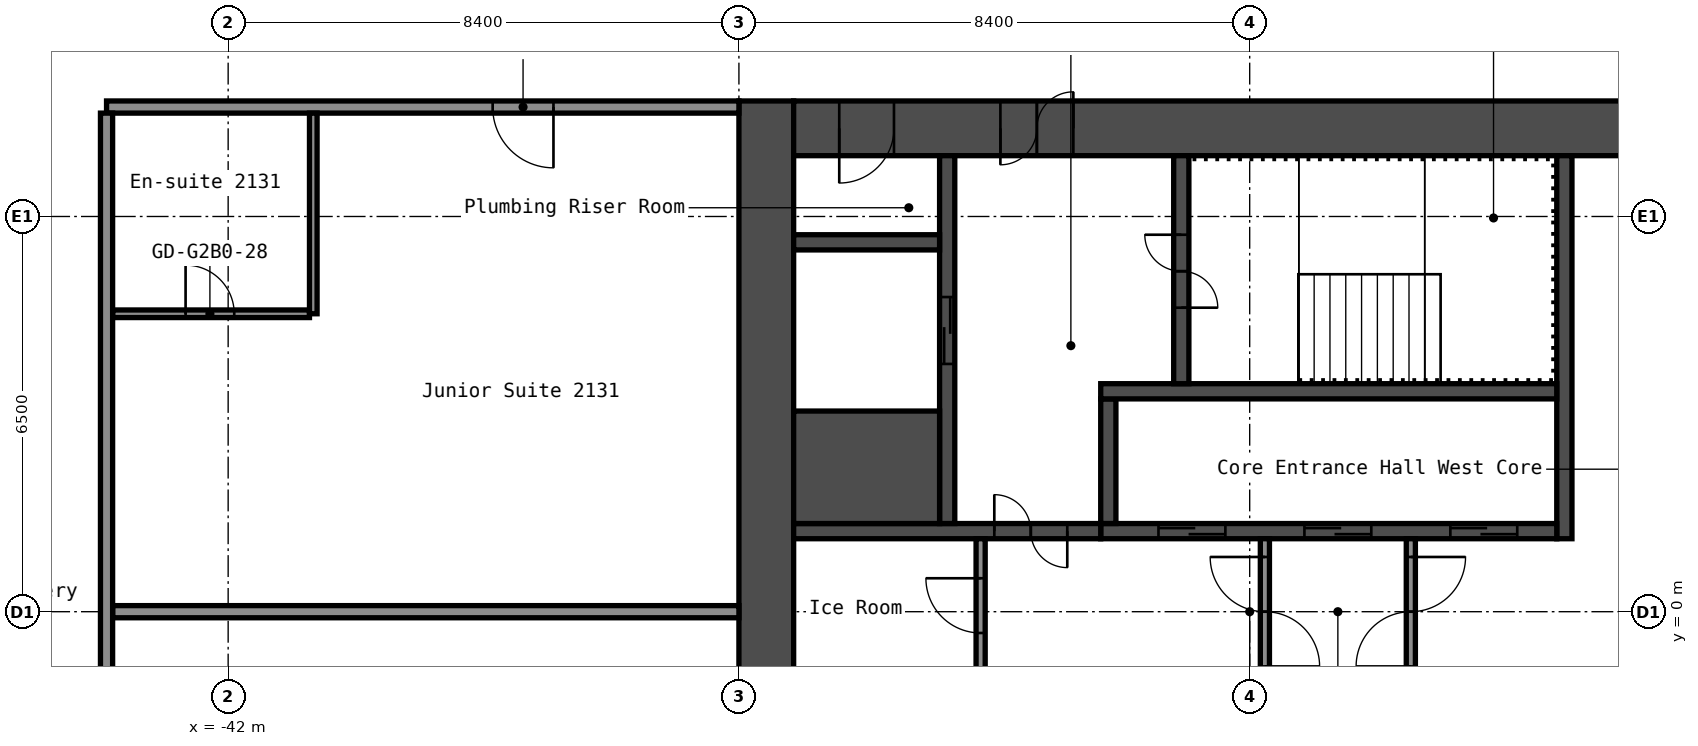
"""IFC4 building model, lengths in metres.
Left out: names, types, materials, properties, quantities, classifications, styles, units other than length and angle.
Written with IfcOpenShell. Run it as: python <this file> out.ifc"""

import sys

from ifc_helpers import new_model, si_unit, direction, frame, frame_2d, origin, place, context, subcontext, project, spatial, rectangle, extrude, element, fill, save


model = new_model("IFC4")
c1 = context("Model", 3, precision=1e-05, world=origin(), true_north=direction((0.0, 1.0)))
c2 = subcontext(c1, "Body", "Model", "MODEL_VIEW")
j1 = project(units=[si_unit("LENGTHUNIT", "METRE"), si_unit("PLANEANGLEUNIT", "RADIAN")], contexts=[c1])
p1 = place(None, origin())
s1 = spatial("IfcSite", under=j1, at=p1, CompositionType="ELEMENT")
p2 = place(p1, origin())
s2 = spatial("IfcBuilding", under=s1, at=p2, CompositionType="ELEMENT")
p3 = place(p2, frame((0.0, 0.0, 78.6)))
s3 = spatial("IfcBuildingStorey", under=s2, at=p3, CompositionType="ELEMENT", Elevation=78.6)
p4 = place(p3, frame((-33.15, -8.4, 0.0), z_axis=(0.0, 0.0, 1.0), x_axis=(0.0, 1.0, 0.0)))
e1 = element("IfcWall", 1, at=p4, inside=s3, PredefinedType="SHEAR", context=c2, shape_type="SweptSolid", body=[
    extrude(rectangle(XDim=16.8, YDim=0.9, at=frame_2d((8.4, 0.0))), origin(), (0.0, 0.0, 1.0), 2.8),
])
p5 = place(p3, frame((-32.7, 7.95, 0.0), z_axis=(0.0, 0.0, 1.0), x_axis=(1.0, 0.0, 0.0)))
e2 = element("IfcWall", 2, at=p5, inside=s3, PredefinedType="SHEAR", context=c2, shape_type="SweptSolid", body=[
    extrude(rectangle(XDim=15.0, YDim=0.9, at=frame_2d((7.5, 0.0))), origin(), (0.0, 0.0, 1.0), 2.8),
])
p6 = place(p5, frame((3.4, 0.0, 0.0)))
e3 = element("IfcOpeningElement", 3, at=p6, cuts=e2, PredefinedType="OPENING", context=c2, shape_type="SweptSolid", body=[
    extrude(rectangle(XDim=1.2, YDim=2.1, at=frame_2d((0.6, 1.05))), frame((0.0, 0.46, 0.0), z_axis=(0.0, -1.0, 0.0), x_axis=(1.0, 0.0, 0.0)), (0.0, 0.0, 1.0), 0.92),
])
p7 = place(p5, frame((0.75, 0.0, 0.0)))
e4 = element("IfcOpeningElement", 4, at=p7, cuts=e2, PredefinedType="OPENING", context=c2, shape_type="SweptSolid", body=[
    extrude(rectangle(XDim=0.9, YDim=2.1, at=frame_2d((0.45, 1.05))), frame((0.0, 0.46, 0.0), z_axis=(0.0, -1.0, 0.0), x_axis=(1.0, 0.0, 0.0)), (0.0, 0.0, 1.0), 0.92),
])
p8 = place(p3, frame((-20.025, 1.2, 0.0), z_axis=(0.0, 0.0, 1.0), x_axis=(0.0, 1.0, 0.0)))
e5 = element("IfcWall", 5, at=p8, inside=s3, PredefinedType="SHEAR", context=c2, shape_type="SweptSolid", body=[
    extrude(rectangle(XDim=6.3, YDim=0.25, at=frame_2d((3.15, 0.0))), origin(), (0.0, 0.0, 1.0), 2.8),
])
p9 = place(p3, frame((-27.65, 1.325, 0.0), z_axis=(0.0, 0.0, 1.0), x_axis=(1.0, 0.0, 0.0)))
e6 = element("IfcWall", 6, at=p9, inside=s3, PredefinedType="SHEAR", context=c2, shape_type="SweptSolid", body=[
    extrude(rectangle(XDim=7.5, YDim=0.25, at=frame_2d((3.75, 0.0))), origin(), (0.0, 0.0, 1.0), 2.8),
])
p10 = place(p9, frame((5.75, 0.0, 0.0)))
e7 = element("IfcOpeningElement", 7, at=p10, cuts=e6, PredefinedType="OPENING", context=c2, shape_type="SweptSolid", body=[
    extrude(rectangle(XDim=1.1, YDim=2.1, at=frame_2d((0.55, 1.05))), frame((0.0, 0.135, 0.0), z_axis=(0.0, -1.0, 0.0), x_axis=(1.0, 0.0, 0.0)), (0.0, 0.0, 1.0), 0.27),
])
p11 = place(p9, frame((3.35, 0.0, 0.0)))
e8 = element("IfcOpeningElement", 8, at=p11, cuts=e6, PredefinedType="OPENING", context=c2, shape_type="SweptSolid", body=[
    extrude(rectangle(XDim=1.1, YDim=2.1, at=frame_2d((0.55, 1.05))), frame((0.0, 0.135, 0.0), z_axis=(0.0, -1.0, 0.0), x_axis=(1.0, 0.0, 0.0)), (0.0, 0.0, 1.0), 0.27),
])
p12 = place(p9, frame((0.95, 0.0, 0.0)))
e9 = element("IfcOpeningElement", 9, at=p12, cuts=e6, PredefinedType="OPENING", context=c2, shape_type="SweptSolid", body=[
    extrude(rectangle(XDim=1.1, YDim=2.1, at=frame_2d((0.55, 1.05))), frame((0.0, 0.135, 0.0), z_axis=(0.0, -1.0, 0.0), x_axis=(1.0, 0.0, 0.0)), (0.0, 0.0, 1.0), 0.27),
])
p13 = place(p3, frame((-27.525, 1.45, 0.0), z_axis=(0.0, 0.0, 1.0), x_axis=(0.0, 1.0, 0.0)))
e10 = element("IfcWall", 10, at=p13, inside=s3, PredefinedType="SHEAR", context=c2, shape_type="SweptSolid", body=[
    extrude(rectangle(XDim=2.05, YDim=0.25, at=frame_2d((1.025, 0.0))), origin(), (0.0, 0.0, 1.0), 2.8),
])
p14 = place(p3, frame((-27.65, 3.625, 0.0), z_axis=(0.0, 0.0, 1.0), x_axis=(1.0, 0.0, 0.0)))
e11 = element("IfcWall", 11, at=p14, inside=s3, PredefinedType="SHEAR", context=c2, shape_type="SweptSolid", body=[
    extrude(rectangle(XDim=7.5, YDim=0.25, at=frame_2d((3.75, 0.0))), origin(), (0.0, 0.0, 1.0), 2.8),
])
p15 = place(p3, frame((-26.325, 3.75, 0.0), z_axis=(0.0, 0.0, 1.0), x_axis=(0.0, 1.0, 0.0)))
e12 = element("IfcWall", 12, at=p15, inside=s3, PredefinedType="SHEAR", context=c2, shape_type="SweptSolid", body=[
    extrude(rectangle(XDim=3.75, YDim=0.25, at=frame_2d((1.875, 0.0))), origin(), (0.0, 0.0, 1.0), 2.8),
])
p16 = place(p15, frame((1.25, 0.0, 0.0)))
e13 = element("IfcOpeningElement", 13, at=p16, cuts=e12, PredefinedType="OPENING", context=c2, shape_type="SweptSolid", body=[
    extrude(rectangle(XDim=1.2, YDim=2.1, at=frame_2d((0.6, 1.05))), frame((0.0, 0.135, 0.0), z_axis=(0.0, -1.0, 0.0), x_axis=(1.0, 0.0, 0.0)), (0.0, 0.0, 1.0), 0.27),
])
p17 = place(p3, frame((-32.7, 1.325, 0.0), z_axis=(0.0, 0.0, 1.0), x_axis=(1.0, 0.0, 0.0)))
e14 = element("IfcWall", 14, at=p17, inside=s3, PredefinedType="SHEAR", context=c2, shape_type="SweptSolid", body=[
    extrude(rectangle(XDim=5.05, YDim=0.25, at=frame_2d((2.525, 0.0))), origin(), (0.0, 0.0, 1.0), 2.8),
])
p18 = place(p17, frame((3.3, 0.0, 0.0)))
e15 = element("IfcOpeningElement", 15, at=p18, cuts=e14, PredefinedType="OPENING", context=c2, shape_type="SweptSolid", body=[
    extrude(rectangle(XDim=1.2, YDim=2.1, at=frame_2d((0.6, 1.05))), frame((0.0, 0.135, 0.0), z_axis=(0.0, -1.0, 0.0), x_axis=(1.0, 0.0, 0.0)), (0.0, 0.0, 1.0), 0.27),
])
p19 = place(p3, frame((-30.175, 1.45, 0.0), z_axis=(0.0, 0.0, 1.0), x_axis=(0.0, 1.0, 0.0)))
e16 = element("IfcWall", 16, at=p19, inside=s3, PredefinedType="SHEAR", context=c2, shape_type="SweptSolid", body=[
    extrude(rectangle(XDim=6.05, YDim=0.25, at=frame_2d((3.025, 0.0))), origin(), (0.0, 0.0, 1.0), 2.8),
])
p20 = place(p19, frame((2.625, 0.0, 0.0)))
e17 = element("IfcOpeningElement", 17, at=p20, cuts=e16, PredefinedType="OPENING", context=c2, shape_type="SweptSolid", body=[
    extrude(rectangle(XDim=1.1, YDim=2.1, at=frame_2d((0.55, 1.05))), frame((0.0, 0.135, 0.0), z_axis=(0.0, -1.0, 0.0), x_axis=(1.0, 0.0, 0.0)), (0.0, 0.0, 1.0), 0.27),
])
p21 = place(p3, frame((-32.7, 2.375, 0.0), z_axis=(0.0, 0.0, 1.0), x_axis=(1.0, 0.0, 0.0)))
e18 = element("IfcWall", 18, at=p21, inside=s3, PredefinedType="SHEAR", context=c2, shape_type="SweptSolid", body=[
    extrude(rectangle(XDim=2.4, YDim=1.85, at=frame_2d((1.2, 0.0))), origin(), (0.0, 0.0, 1.0), 2.8),
])
p22 = place(p3, frame((-32.7, 6.075, 0.0), z_axis=(0.0, 0.0, 1.0), x_axis=(1.0, 0.0, 0.0)))
e19 = element("IfcWall", 19, at=p22, inside=s3, PredefinedType="SHEAR", context=c2, shape_type="SweptSolid", body=[
    extrude(rectangle(XDim=2.4, YDim=0.25, at=frame_2d((1.2, 0.0))), origin(), (0.0, 0.0, 1.0), 2.8),
])
p23 = place(p3, frame((-22.55, -1.2, 0.0), z_axis=(0.0, 0.0, 1.0), x_axis=(0.0, 1.0, 0.0)))
e20 = element("IfcWall", 20, at=p23, inside=s3, PredefinedType="PARTITIONING", context=c2, shape_type="SweptSolid", body=[
    extrude(rectangle(XDim=2.4, YDim=0.15, at=frame_2d((1.2, 0.0))), origin(), (0.0, 0.0, 1.0), 2.8),
])
p24 = place(p23, frame((0.3, 0.0, 0.0)))
e21 = element("IfcOpeningElement", 21, at=p24, cuts=e20, PredefinedType="OPENING", context=c2, shape_type="SweptSolid", body=[
    extrude(rectangle(XDim=1.8, YDim=2.1, at=frame_2d((0.9, 1.05))), frame((0.0, 0.085, 0.0), z_axis=(0.0, -1.0, 0.0), x_axis=(1.0, 0.0, 0.0)), (0.0, 0.0, 1.0), 0.17),
])
p25 = place(p3, frame((-24.95, -1.2, 0.0), z_axis=(0.0, 0.0, 1.0), x_axis=(0.0, 1.0, 0.0)))
e22 = element("IfcWall", 22, at=p25, inside=s3, PredefinedType="PARTITIONING", context=c2, shape_type="SweptSolid", body=[
    extrude(rectangle(XDim=2.4, YDim=0.15, at=frame_2d((1.2, 0.0))), origin(), (0.0, 0.0, 1.0), 2.8),
])
p26 = place(p25, frame((0.3, 0.0, 0.0)))
e23 = element("IfcOpeningElement", 23, at=p26, cuts=e22, PredefinedType="OPENING", context=c2, shape_type="SweptSolid", body=[
    extrude(rectangle(XDim=1.8, YDim=2.1, at=frame_2d((0.9, 1.05))), frame((0.0, 0.085, 0.0), z_axis=(0.0, -1.0, 0.0), x_axis=(1.0, 0.0, 0.0)), (0.0, 0.0, 1.0), 0.17),
])
p27 = place(p3, frame((-29.625, -1.15, 0.0), z_axis=(0.0, 0.0, 1.0), x_axis=(0.0, 1.0, 0.0)))
e24 = element("IfcWall", 24, at=p27, inside=s3, PredefinedType="PARTITIONING", context=c2, shape_type="SweptSolid", body=[
    extrude(rectangle(XDim=2.35, YDim=0.15, at=frame_2d((1.175, 0.0))), origin(), (0.0, 0.0, 1.0), 2.8),
])
p28 = place(p27, frame((0.8, 0.0, 0.0)))
e25 = element("IfcOpeningElement", 25, at=p28, cuts=e24, PredefinedType="OPENING", context=c2, shape_type="SweptSolid", body=[
    extrude(rectangle(XDim=0.9, YDim=2.1, at=frame_2d((0.45, 1.05))), frame((0.0, 0.085, 0.0), z_axis=(0.0, -1.0, 0.0), x_axis=(1.0, 0.0, 0.0)), (0.0, 0.0, 1.0), 0.17),
])
p29 = place(p3, frame((-43.9, 0.0, 0.0), z_axis=(0.0, 0.0, 1.0), x_axis=(1.0, 0.0, 0.0)))
e26 = element("IfcWall", 26, at=p29, inside=s3, PredefinedType="PARTITIONING", context=c2, shape_type="SweptSolid", body=[
    extrude(rectangle(XDim=10.3, YDim=0.2, at=frame_2d((5.15, 0.0))), origin(), (0.0, 0.0, 1.0), 2.8),
])
p30 = place(p3, frame((-43.9, 4.9, 0.0), z_axis=(0.0, 0.0, 1.0), x_axis=(1.0, 0.0, 0.0)))
e27 = element("IfcWall", 27, at=p30, inside=s3, PredefinedType="PARTITIONING", context=c2, shape_type="SweptSolid", body=[
    extrude(rectangle(XDim=3.237, YDim=0.125, at=frame_2d((1.619, 0.0))), origin(), (0.0, 0.0, 1.0), 2.8),
])
p31 = place(p30, frame((1.2, 0.0, 0.0)))
e28 = element("IfcOpeningElement", 28, at=p31, cuts=e27, PredefinedType="OPENING", context=c2, shape_type="SweptSolid", body=[
    extrude(rectangle(XDim=0.8, YDim=2.1, at=frame_2d((0.4, 1.05))), frame((0.0, 0.073, 0.0), z_axis=(0.0, -1.0, 0.0), x_axis=(1.0, 0.0, 0.0)), (0.0, 0.0, 1.0), 0.145),
])
p32 = place(p3, frame((-44.0, 8.3, 0.0), z_axis=(0.0, 0.0, 1.0), x_axis=(1.0, 0.0, 0.0)))
e29 = element("IfcWall", 29, at=p32, inside=s3, PredefinedType="PARTITIONING", context=c2, shape_type="SweptSolid", body=[
    extrude(rectangle(XDim=10.4, YDim=0.2, at=frame_2d((5.2, 0.0))), origin(), (0.0, 0.0, 1.0), 2.8),
])
p33 = place(p32, frame((6.35, 0.0, 0.0)))
e30 = element("IfcOpeningElement", 30, at=p33, cuts=e29, PredefinedType="OPENING", context=c2, shape_type="SweptSolid", body=[
    extrude(rectangle(XDim=1.0, YDim=2.1, at=frame_2d((0.5, 1.05))), frame((0.0, 0.11, 0.0), z_axis=(0.0, -1.0, 0.0), x_axis=(1.0, 0.0, 0.0)), (0.0, 0.0, 1.0), 0.22),
])
p34 = place(p3, frame((-44.0, -8.2, 0.0), z_axis=(0.0, 0.0, 1.0), x_axis=(0.0, 1.0, 0.0)))
e31 = element("IfcWall", 31, at=p34, inside=s3, PredefinedType="PARTITIONING", context=c2, shape_type="SweptSolid", body=[
    extrude(rectangle(XDim=16.4, YDim=0.2, at=frame_2d((8.2, 0.0))), origin(), (0.0, 0.0, 1.0), 2.8),
])
p35 = place(p3, frame((-40.6, 4.9, 0.0), z_axis=(0.0, 0.0, 1.0), x_axis=(0.0, 1.0, 0.0)))
e32 = element("IfcWall", 32, at=p35, inside=s3, PredefinedType="PARTITIONING", context=c2, shape_type="SweptSolid", body=[
    extrude(rectangle(XDim=3.3, YDim=0.125, at=frame_2d((1.65, 0.0))), origin(), (0.0, 0.0, 1.0), 2.8),
])
p36 = place(p6, origin())
e33 = element("IfcDoor", 33, at=p36, inside=s3, OperationType="DOUBLE_DOOR_SINGLE_SWING", PredefinedType="DOOR", context=c2, shape_type="SweptSolid", body=[
    extrude(rectangle(XDim=1.2, YDim=2.1, at=frame_2d((0.6, 1.05))), frame((0.0, 0.025, 0.0), z_axis=(0.0, -1.0, 0.0), x_axis=(1.0, 0.0, 0.0)), (0.0, 0.0, 1.0), 0.05),
])
fill(e3, e33)
p37 = place(p7, origin())
e34 = element("IfcDoor", 34, at=p37, inside=s3, OperationType="SINGLE_SWING_LEFT", PredefinedType="DOOR", context=c2, shape_type="SweptSolid", body=[
    extrude(rectangle(XDim=0.9, YDim=2.1, at=frame_2d((0.45, 1.05))), frame((0.0, 0.025, 0.0), z_axis=(0.0, -1.0, 0.0), x_axis=(1.0, 0.0, 0.0)), (0.0, 0.0, 1.0), 0.05),
])
fill(e4, e34)
p38 = place(p16, origin())
e35 = element("IfcDoor", 35, at=p38, inside=s3, OperationType="DOUBLE_DOOR_SINGLE_SWING", PredefinedType="DOOR", context=c2, shape_type="SweptSolid", body=[
    extrude(rectangle(XDim=1.2, YDim=2.1, at=frame_2d((0.6, 1.05))), frame((0.0, 0.025, 0.0), z_axis=(0.0, -1.0, 0.0), x_axis=(1.0, 0.0, 0.0)), (0.0, 0.0, 1.0), 0.05),
])
fill(e13, e35)
p39 = place(p18, origin())
e36 = element("IfcDoor", 36, at=p39, inside=s3, OperationType="DOUBLE_DOOR_SINGLE_SWING", PredefinedType="DOOR", context=c2, shape_type="SweptSolid", body=[
    extrude(rectangle(XDim=1.2, YDim=2.1, at=frame_2d((0.6, 1.05))), frame((0.0, 0.025, 0.0), z_axis=(0.0, -1.0, 0.0), x_axis=(1.0, 0.0, 0.0)), (0.0, 0.0, 1.0), 0.05),
])
fill(e15, e36)
p40 = place(p24, origin())
e37 = element("IfcDoor", 37, at=p40, inside=s3, OperationType="DOUBLE_DOOR_SINGLE_SWING", PredefinedType="DOOR", context=c2, shape_type="SweptSolid", body=[
    extrude(rectangle(XDim=1.8, YDim=2.1, at=frame_2d((0.9, 1.05))), frame((0.0, 0.025, 0.0), z_axis=(0.0, -1.0, 0.0), x_axis=(1.0, 0.0, 0.0)), (0.0, 0.0, 1.0), 0.05),
])
fill(e21, e37)
p41 = place(p26, origin())
e38 = element("IfcDoor", 38, at=p41, inside=s3, OperationType="DOUBLE_DOOR_SINGLE_SWING", PredefinedType="DOOR", context=c2, shape_type="SweptSolid", body=[
    extrude(rectangle(XDim=1.8, YDim=2.1, at=frame_2d((0.9, 1.05))), frame((0.0, 0.025, 0.0), z_axis=(0.0, -1.0, 0.0), x_axis=(1.0, 0.0, 0.0)), (0.0, 0.0, 1.0), 0.05),
])
fill(e23, e38)
p42 = place(p28, origin())
e39 = element("IfcDoor", 39, at=p42, inside=s3, OperationType="SINGLE_SWING_LEFT", PredefinedType="DOOR", context=c2, shape_type="SweptSolid", body=[
    extrude(rectangle(XDim=0.9, YDim=2.1, at=frame_2d((0.45, 1.05))), frame((0.0, 0.025, 0.0), z_axis=(0.0, -1.0, 0.0), x_axis=(1.0, 0.0, 0.0)), (0.0, 0.0, 1.0), 0.05),
])
fill(e25, e39)
p43 = place(p10, origin())
e40 = element("IfcDoor", 40, at=p43, inside=s3, OperationType="DOUBLE_DOOR_SLIDING", PredefinedType="DOOR", context=c2, shape_type="SweptSolid", body=[
    extrude(rectangle(XDim=1.1, YDim=2.1, at=frame_2d((0.55, 1.05))), frame((0.0, 0.025, 0.0), z_axis=(0.0, -1.0, 0.0), x_axis=(1.0, 0.0, 0.0)), (0.0, 0.0, 1.0), 0.05),
])
fill(e7, e40)
p44 = place(p11, origin())
e41 = element("IfcDoor", 41, at=p44, inside=s3, OperationType="DOUBLE_DOOR_SLIDING", PredefinedType="DOOR", context=c2, shape_type="SweptSolid", body=[
    extrude(rectangle(XDim=1.1, YDim=2.1, at=frame_2d((0.55, 1.05))), frame((0.0, 0.025, 0.0), z_axis=(0.0, -1.0, 0.0), x_axis=(1.0, 0.0, 0.0)), (0.0, 0.0, 1.0), 0.05),
])
fill(e8, e41)
p45 = place(p12, origin())
e42 = element("IfcDoor", 42, at=p45, inside=s3, OperationType="DOUBLE_DOOR_SLIDING", PredefinedType="DOOR", context=c2, shape_type="SweptSolid", body=[
    extrude(rectangle(XDim=1.1, YDim=2.1, at=frame_2d((0.55, 1.05))), frame((0.0, 0.025, 0.0), z_axis=(0.0, -1.0, 0.0), x_axis=(1.0, 0.0, 0.0)), (0.0, 0.0, 1.0), 0.05),
])
fill(e9, e42)
p46 = place(p20, origin())
e43 = element("IfcDoor", 43, at=p46, inside=s3, OperationType="DOUBLE_DOOR_SLIDING", PredefinedType="DOOR", context=c2, shape_type="SweptSolid", body=[
    extrude(rectangle(XDim=1.1, YDim=2.1, at=frame_2d((0.55, 1.05))), frame((0.0, 0.025, 0.0), z_axis=(0.0, -1.0, 0.0), x_axis=(1.0, 0.0, 0.0)), (0.0, 0.0, 1.0), 0.05),
])
fill(e17, e43)
p47 = place(p31, origin())
e44 = element("IfcDoor", 44, at=p47, inside=s3, OperationType="SINGLE_SWING_RIGHT", PredefinedType="DOOR", context=c2, shape_type="SweptSolid", body=[
    extrude(rectangle(XDim=0.8, YDim=2.1, at=frame_2d((0.4, 1.05))), frame((0.0, 0.025, 0.0), z_axis=(0.0, -1.0, 0.0), x_axis=(1.0, 0.0, 0.0)), (0.0, 0.0, 1.0), 0.05),
])
fill(e28, e44)
p48 = place(p33, origin())
e45 = element("IfcDoor", 45, at=p48, inside=s3, OperationType="SINGLE_SWING_RIGHT", PredefinedType="DOOR", context=c2, shape_type="SweptSolid", body=[
    extrude(rectangle(XDim=1.0, YDim=2.1, at=frame_2d((0.5, 1.05))), frame((0.0, 0.025, 0.0), z_axis=(0.0, -1.0, 0.0), x_axis=(1.0, 0.0, 0.0)), (0.0, 0.0, 1.0), 0.05),
])
fill(e30, e45)
save(model, sys.argv[1])
